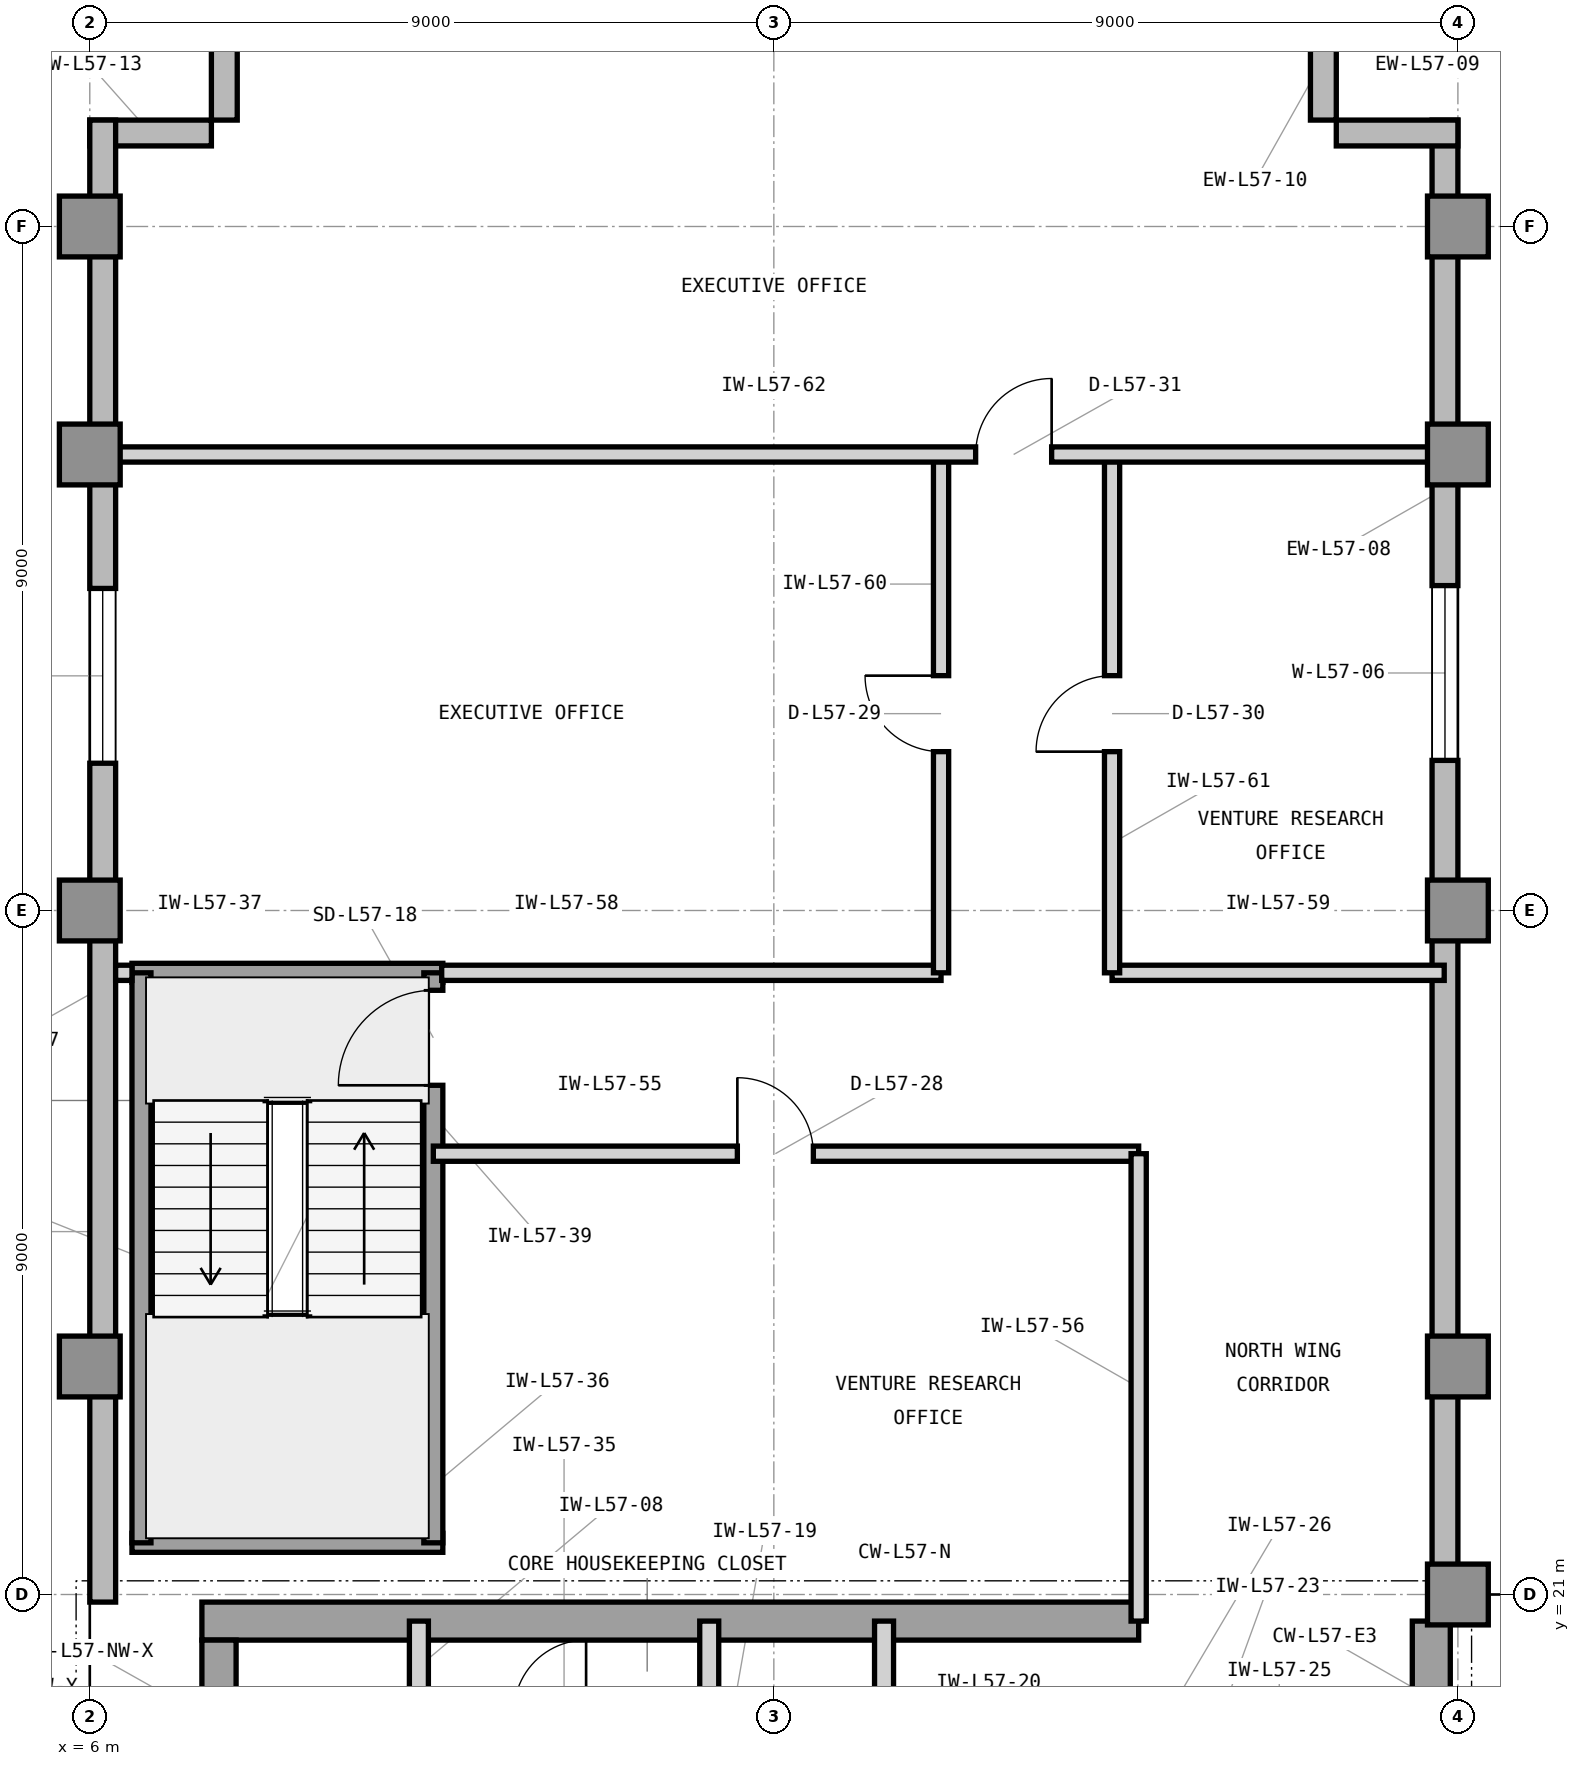
"""IFC4 building model, lengths in metres.
Left out: names, types, materials, properties, quantities, classifications, styles, units other than length and angle.
Written with IfcOpenShell. Run it as: python <this file> out.ifc"""

import sys

from ifc_helpers import new_model, si_unit, direction, frame, frame_2d, origin, origin_2d, place, context, subcontext, project, spatial, rectangle, extrude, element, fill, save


model = new_model("IFC4")
c1 = context("Model", 3, precision=1e-05, world=origin(), true_north=direction((0.0, 1.0)))
c2 = subcontext(c1, "Body", "Model", "MODEL_VIEW")
j1 = project(units=[si_unit("LENGTHUNIT", "METRE"), si_unit("PLANEANGLEUNIT", "RADIAN")], contexts=[c1])
p1 = place(None, origin())
s1 = spatial("IfcSite", under=j1, at=p1, CompositionType="ELEMENT")
p2 = place(p1, origin())
s2 = spatial("IfcBuilding", under=s1, at=p2, CompositionType="ELEMENT")
p3 = place(p2, frame((0.0, 0.0, 235.2)))
s3 = spatial("IfcBuildingStorey", under=s2, at=p3, CompositionType="ELEMENT", Elevation=235.2)
p4 = place(p3, frame((7.475, 20.65, 0.0), z_axis=(0.0, 0.0, 1.0), x_axis=(1.0, 0.0, 0.0)))
e1 = element("IfcWall", 1, at=p4, inside=s3, PredefinedType="SHEAR", context=c2, shape_type="SweptSolid", body=[
    extrude(rectangle(XDim=12.325, YDim=0.5, at=frame_2d((6.163, 0.0))), origin(), (0.0, 0.0, 1.0), 3.9),
])
p5 = place(p3, frame((23.65, 16.6, 0.0), z_axis=(0.0, 0.0, 1.0), x_axis=(0.0, 1.0, 0.0)))
e2 = element("IfcWall", 2, at=p5, inside=s3, PredefinedType="SHEAR", context=c2, shape_type="SweptSolid", body=[
    extrude(rectangle(XDim=4.05, YDim=0.5, at=frame_2d((2.025, 0.0))), origin(), (0.0, 0.0, 1.0), 3.9),
])
p6 = place(p3, frame((7.7, 19.575, 0.0), z_axis=(0.0, 0.0, 1.0), x_axis=(0.0, 1.0, 0.0)))
e3 = element("IfcWall", 3, at=p6, inside=s3, PredefinedType="SHEAR", context=c2, shape_type="SweptSolid", body=[
    extrude(rectangle(XDim=0.825, YDim=0.45, at=frame_2d((0.413, 0.0))), origin(), (0.0, 0.0, 1.0), 3.9),
])
for number, where, z_axis, x_axis in (
    (4, (24.0, 21.0, 0.0), (0.0, 0.0, 1.0), (1.0, 0.0, 0.0)),
    (5, (6.0, 24.0, 0.0), (0.0, 0.0, 1.0), (1.0, 0.0, 0.0)),
    (6, (24.0, 24.0, 0.0), (0.0, 0.0, 1.0), (1.0, 0.0, 0.0)),
    (7, (6.0, 30.0, 0.0), (0.0, 0.0, 1.0), (1.0, 0.0, 0.0)),
    (8, (24.0, 30.0, 0.0), (0.0, 0.0, 1.0), (1.0, 0.0, 0.0)),
    (9, (6.0, 36.0, 0.0), (0.0, 0.0, 1.0), (1.0, 0.0, 0.0)),
    (10, (24.0, 36.0, 0.0), (0.0, 0.0, 1.0), (1.0, 0.0, 0.0)),
    (11, (6.0, 39.0, 0.0), (0.0, 0.0, 1.0), (1.0, 0.0, 0.0)),
    (12, (24.0, 39.0, 0.0), (0.0, 0.0, 1.0), (1.0, 0.0, 0.0)),
):
    element("IfcColumn", number, at=place(p3, frame(where, z_axis=z_axis, x_axis=x_axis)), inside=s3, PredefinedType="COLUMN", context=c2, shape_type="SweptSolid", body=[
        extrude(rectangle(XDim=0.8, YDim=0.8, at=origin_2d()), origin(), (0.0, 0.0, 1.0), 3.9),
    ])
p7 = place(p3, frame((23.83, 21.0, 0.0), z_axis=(0.0, 0.0, 1.0), x_axis=(0.0, 1.0, 0.0)))
e13 = element("IfcWall", 13, at=p7, inside=s3, PredefinedType="STANDARD", context=c2, shape_type="SweptSolid", body=[
    extrude(rectangle(XDim=19.4, YDim=0.34, at=frame_2d((9.7, 0.0))), origin(), (0.0, 0.0, 1.0), 3.7),
])
p8 = place(p7, frame((10.975, 0.0, 0.9)))
e14 = element("IfcOpeningElement", 14, at=p8, cuts=e13, PredefinedType="OPENING", context=c2, shape_type="SweptSolid", body=[
    extrude(rectangle(XDim=2.3, YDim=2.2, at=frame_2d((1.15, 1.1))), frame((0.0, 0.18, 0.0), z_axis=(0.0, -1.0, 0.0), x_axis=(1.0, 0.0, 0.0)), (0.0, 0.0, 1.0), 0.36),
])
for number, where, z_axis, x_axis in (
    (15, (24.0, 40.23, 0.0), (0.0, 0.0, 1.0), (-1.0, 0.0, 0.0)),
    (16, (22.23, 40.4, 0.0), (0.0, 0.0, 1.0), (0.0, 1.0, 0.0)),
    (17, (7.77, 42.0, 0.0), (0.0, 0.0, 1.0), (0.0, -1.0, 0.0)),
    (18, (7.6, 40.23, 0.0), (0.0, 0.0, 1.0), (-1.0, 0.0, 0.0)),
):
    element("IfcWall", number, at=place(p3, frame(where, z_axis=z_axis, x_axis=x_axis)), inside=s3, PredefinedType="STANDARD", context=c2, shape_type="SweptSolid", body=[
        extrude(rectangle(XDim=1.6, YDim=0.34, at=frame_2d((0.8, 0.0))), origin(), (0.0, 0.0, 1.0), 3.7),
    ])
p9 = place(p3, frame((6.17, 40.4, 0.0), z_axis=(0.0, 0.0, 1.0), x_axis=(0.0, -1.0, 0.0)))
e19 = element("IfcWall", 19, at=p9, inside=s3, PredefinedType="STANDARD", context=c2, shape_type="SweptSolid", body=[
    extrude(rectangle(XDim=19.5, YDim=0.34, at=frame_2d((9.75, 0.0))), origin(), (0.0, 0.0, 1.0), 3.7),
])
p10 = place(p9, frame((6.163, 0.0, 0.9)))
e20 = element("IfcOpeningElement", 20, at=p10, cuts=e19, PredefinedType="OPENING", context=c2, shape_type="SweptSolid", body=[
    extrude(rectangle(XDim=2.3, YDim=2.2, at=frame_2d((1.15, 1.1))), frame((0.0, 0.18, 0.0), z_axis=(0.0, -1.0, 0.0), x_axis=(1.0, 0.0, 0.0)), (0.0, 0.0, 1.0), 0.36),
])
p11 = place(p3, frame((10.33, 19.45, 0.0), z_axis=(0.0, 0.0, 1.0), x_axis=(0.0, 1.0, 0.0)))
e21 = element("IfcWall", 21, at=p11, inside=s3, PredefinedType="PARTITIONING", context=c2, shape_type="SweptSolid", body=[
    extrude(rectangle(XDim=1.2, YDim=0.25, at=frame_2d((0.6, 0.0))), origin(), (0.0, 0.0, 1.0), 3.69),
])
for number, where, z_axis, x_axis in (
    (22, (14.15, 16.7, 0.0), (0.0, 0.0, 1.0), (0.0, 1.0, 0.0)),
    (23, (16.45, 16.7, 0.0), (0.0, 0.0, 1.0), (0.0, 1.0, 0.0)),
):
    element("IfcWall", number, at=place(p3, frame(where, z_axis=z_axis, x_axis=x_axis)), inside=s3, PredefinedType="PARTITIONING", context=c2, shape_type="SweptSolid", body=[
        extrude(rectangle(XDim=3.95, YDim=0.25, at=frame_2d((1.975, 0.0))), origin(), (0.0, 0.0, 1.0), 3.69),
    ])
for number, where, z_axis, x_axis in (
    (24, (6.555, 21.68, 0.0), (0.0, 0.0, 1.0), (1.0, 0.0, 0.0)),
    (25, (6.555, 29.18, 0.0), (0.0, 0.0, 1.0), (1.0, 0.0, 0.0)),
):
    element("IfcWall", number, at=place(p3, frame(where, z_axis=z_axis, x_axis=x_axis)), inside=s3, PredefinedType="SHEAR", context=c2, shape_type="SweptSolid", body=[
        extrude(rectangle(XDim=4.09, YDim=0.25, at=frame_2d((2.045, 0.0))), origin(), (0.0, 0.0, 1.0), 3.9),
    ])
p12 = place(p3, frame((6.68, 21.68, 0.0), z_axis=(0.0, 0.0, 1.0), x_axis=(0.0, 1.0, 0.0)))
e26 = element("IfcWall", 26, at=p12, inside=s3, PredefinedType="SHEAR", context=c2, shape_type="SweptSolid", body=[
    extrude(rectangle(XDim=7.5, YDim=0.25, at=frame_2d((3.75, 0.0))), origin(), (0.0, 0.0, 1.0), 3.9),
])
p13 = place(p3, frame((10.52, 21.68, 0.0), z_axis=(0.0, 0.0, 1.0), x_axis=(0.0, 1.0, 0.0)))
e27 = element("IfcWall", 27, at=p13, inside=s3, PredefinedType="SHEAR", context=c2, shape_type="SweptSolid", body=[
    extrude(rectangle(XDim=7.5, YDim=0.25, at=frame_2d((3.75, 0.0))), origin(), (0.0, 0.0, 1.0), 3.9),
])
p14 = place(p13, frame((6.02, 0.0, 0.0)))
e28 = element("IfcOpeningElement", 28, at=p14, cuts=e27, PredefinedType="OPENING", context=c2, shape_type="SweptSolid", body=[
    extrude(rectangle(XDim=1.25, YDim=2.2, at=frame_2d((0.625, 1.1))), frame((0.0, 0.135, 0.0), z_axis=(0.0, -1.0, 0.0), x_axis=(1.0, 0.0, 0.0)), (0.0, 0.0, 1.0), 0.27),
])
p15 = place(p3, frame((10.52, 26.8, 0.0), z_axis=(0.0, 0.0, 1.0), x_axis=(1.0, 0.0, 0.0)))
e29 = element("IfcWall", 29, at=p15, inside=s3, PredefinedType="PARTITIONING", context=c2, shape_type="SweptSolid", body=[
    extrude(rectangle(XDim=9.28, YDim=0.2, at=frame_2d((4.64, 0.0))), origin(), (0.0, 0.0, 1.0), 3.69),
])
p16 = place(p15, frame((4.0, 0.0, 0.0)))
e30 = element("IfcOpeningElement", 30, at=p16, cuts=e29, PredefinedType="OPENING", context=c2, shape_type="SweptSolid", body=[
    extrude(rectangle(XDim=1.0, YDim=2.15, at=frame_2d((0.5, 1.075))), frame((0.0, 0.11, 0.0), z_axis=(0.0, -1.0, 0.0), x_axis=(1.0, 0.0, 0.0)), (0.0, 0.0, 1.0), 0.22),
])
p17 = place(p3, frame((19.8, 20.65, 0.0), z_axis=(0.0, 0.0, 1.0), x_axis=(0.0, 1.0, 0.0)))
e31 = element("IfcWall", 31, at=p17, inside=s3, PredefinedType="PARTITIONING", context=c2, shape_type="SweptSolid", body=[
    extrude(rectangle(XDim=6.15, YDim=0.2, at=frame_2d((3.075, 0.0))), origin(), (0.0, 0.0, 1.0), 3.69),
])
p18 = place(p3, frame((6.34, 29.18, 0.0), z_axis=(0.0, 0.0, 1.0), x_axis=(1.0, 0.0, 0.0)))
e32 = element("IfcWall", 32, at=p18, inside=s3, PredefinedType="PARTITIONING", context=c2, shape_type="SweptSolid", body=[
    extrude(rectangle(XDim=0.215, YDim=0.2, at=frame_2d((0.107, 0.0))), origin(), (0.0, 0.0, 1.0), 3.69),
])
p19 = place(p3, frame((10.63, 29.18, 0.0), z_axis=(0.0, 0.0, 1.0), x_axis=(1.0, 0.0, 0.0)))
e33 = element("IfcWall", 33, at=p19, inside=s3, PredefinedType="PARTITIONING", context=c2, shape_type="SweptSolid", body=[
    extrude(rectangle(XDim=6.57, YDim=0.2, at=frame_2d((3.285, 0.0))), origin(), (0.0, 0.0, 1.0), 3.69),
])
p20 = place(p3, frame((19.45, 29.18, 0.0), z_axis=(0.0, 0.0, 1.0), x_axis=(1.0, 0.0, 0.0)))
e34 = element("IfcWall", 34, at=p20, inside=s3, PredefinedType="PARTITIONING", context=c2, shape_type="SweptSolid", body=[
    extrude(rectangle(XDim=4.37, YDim=0.2, at=frame_2d((2.185, 0.0))), origin(), (0.0, 0.0, 1.0), 3.69),
])
p21 = place(p3, frame((17.2, 29.18, 0.0), z_axis=(0.0, 0.0, 1.0), x_axis=(0.0, 1.0, 0.0)))
e35 = element("IfcWall", 35, at=p21, inside=s3, PredefinedType="PARTITIONING", context=c2, shape_type="SweptSolid", body=[
    extrude(rectangle(XDim=6.82, YDim=0.2, at=frame_2d((3.41, 0.0))), origin(), (0.0, 0.0, 1.0), 3.69),
])
p22 = place(p21, frame((2.91, 0.0, 0.0)))
e36 = element("IfcOpeningElement", 36, at=p22, cuts=e35, PredefinedType="OPENING", context=c2, shape_type="SweptSolid", body=[
    extrude(rectangle(XDim=1.0, YDim=2.15, at=frame_2d((0.5, 1.075))), frame((0.0, 0.11, 0.0), z_axis=(0.0, -1.0, 0.0), x_axis=(1.0, 0.0, 0.0)), (0.0, 0.0, 1.0), 0.22),
])
p23 = place(p3, frame((19.45, 29.18, 0.0), z_axis=(0.0, 0.0, 1.0), x_axis=(0.0, 1.0, 0.0)))
e37 = element("IfcWall", 37, at=p23, inside=s3, PredefinedType="PARTITIONING", context=c2, shape_type="SweptSolid", body=[
    extrude(rectangle(XDim=6.82, YDim=0.2, at=frame_2d((3.41, 0.0))), origin(), (0.0, 0.0, 1.0), 3.69),
])
p24 = place(p23, frame((2.91, 0.0, 0.0)))
e38 = element("IfcOpeningElement", 38, at=p24, cuts=e37, PredefinedType="OPENING", context=c2, shape_type="SweptSolid", body=[
    extrude(rectangle(XDim=1.0, YDim=2.15, at=frame_2d((0.5, 1.075))), frame((0.0, 0.11, 0.0), z_axis=(0.0, -1.0, 0.0), x_axis=(1.0, 0.0, 0.0)), (0.0, 0.0, 1.0), 0.22),
])
p25 = place(p3, frame((6.18, 36.0, 0.0), z_axis=(0.0, 0.0, 1.0), x_axis=(1.0, 0.0, 0.0)))
e39 = element("IfcWall", 39, at=p25, inside=s3, PredefinedType="PARTITIONING", context=c2, shape_type="SweptSolid", body=[
    extrude(rectangle(XDim=17.64, YDim=0.2, at=frame_2d((8.82, 0.0))), origin(), (0.0, 0.0, 1.0), 3.073),
])
p26 = place(p25, frame((11.475, 0.0, 0.0)))
e40 = element("IfcOpeningElement", 40, at=p26, cuts=e39, PredefinedType="OPENING", context=c2, shape_type="SweptSolid", body=[
    extrude(rectangle(XDim=1.0, YDim=2.15, at=frame_2d((0.5, 1.075))), frame((0.0, 0.11, 0.0), z_axis=(0.0, -1.0, 0.0), x_axis=(1.0, 0.0, 0.0)), (0.0, 0.0, 1.0), 0.22),
])
p27 = place(p8, origin())
e41 = element("IfcWindow", 41, at=p27, inside=s3, PartitioningType="SINGLE_PANEL", PredefinedType="WINDOW", context=c2, shape_type="SweptSolid", body=[
    extrude(rectangle(XDim=2.3, YDim=2.2, at=frame_2d((1.15, 1.1))), frame((0.0, 0.11, 0.0), z_axis=(0.0, -1.0, 0.0), x_axis=(1.0, 0.0, 0.0)), (0.0, 0.0, 1.0), 0.06),
])
fill(e14, e41)
p28 = place(p10, origin())
e42 = element("IfcWindow", 42, at=p28, inside=s3, PartitioningType="SINGLE_PANEL", PredefinedType="WINDOW", context=c2, shape_type="SweptSolid", body=[
    extrude(rectangle(XDim=2.3, YDim=2.2, at=frame_2d((1.15, 1.1))), frame((0.0, 0.11, 0.0), z_axis=(0.0, -1.0, 0.0), x_axis=(1.0, 0.0, 0.0)), (0.0, 0.0, 1.0), 0.06),
])
fill(e20, e42)
p29 = place(p14, origin())
e43 = element("IfcDoor", 43, at=p29, inside=s3, OperationType="SINGLE_SWING_LEFT", PredefinedType="DOOR", context=c2, shape_type="SweptSolid", body=[
    extrude(rectangle(XDim=1.25, YDim=2.2, at=frame_2d((0.625, 1.1))), frame((0.0, 0.025, 0.0), z_axis=(0.0, -1.0, 0.0), x_axis=(1.0, 0.0, 0.0)), (0.0, 0.0, 1.0), 0.05),
])
fill(e28, e43)
p30 = place(p16, origin())
e44 = element("IfcDoor", 44, at=p30, inside=s3, OperationType="SINGLE_SWING_LEFT", PredefinedType="DOOR", context=c2, shape_type="SweptSolid", body=[
    extrude(rectangle(XDim=1.0, YDim=2.15, at=frame_2d((0.5, 1.075))), frame((0.0, 0.025, 0.0), z_axis=(0.0, -1.0, 0.0), x_axis=(1.0, 0.0, 0.0)), (0.0, 0.0, 1.0), 0.05),
])
fill(e30, e44)
p31 = place(p22, origin())
e45 = element("IfcDoor", 45, at=p31, inside=s3, OperationType="SINGLE_SWING_RIGHT", PredefinedType="DOOR", context=c2, shape_type="SweptSolid", body=[
    extrude(rectangle(XDim=1.0, YDim=2.15, at=frame_2d((0.5, 1.075))), frame((0.0, 0.025, 0.0), z_axis=(0.0, -1.0, 0.0), x_axis=(1.0, 0.0, 0.0)), (0.0, 0.0, 1.0), 0.05),
])
fill(e36, e45)
p32 = place(p24, origin())
e46 = element("IfcDoor", 46, at=p32, inside=s3, OperationType="SINGLE_SWING_LEFT", PredefinedType="DOOR", context=c2, shape_type="SweptSolid", body=[
    extrude(rectangle(XDim=1.0, YDim=2.15, at=frame_2d((0.5, 1.075))), frame((0.0, 0.025, 0.0), z_axis=(0.0, -1.0, 0.0), x_axis=(1.0, 0.0, 0.0)), (0.0, 0.0, 1.0), 0.05),
])
fill(e38, e46)
p33 = place(p26, origin())
e47 = element("IfcDoor", 47, at=p33, inside=s3, OperationType="SINGLE_SWING_RIGHT", PredefinedType="DOOR", context=c2, shape_type="SweptSolid", body=[
    extrude(rectangle(XDim=1.0, YDim=2.15, at=frame_2d((0.5, 1.075))), frame((0.0, 0.025, 0.0), z_axis=(0.0, -1.0, 0.0), x_axis=(1.0, 0.0, 0.0)), (0.0, 0.0, 1.0), 0.05),
])
fill(e40, e47)
save(model, sys.argv[1])
